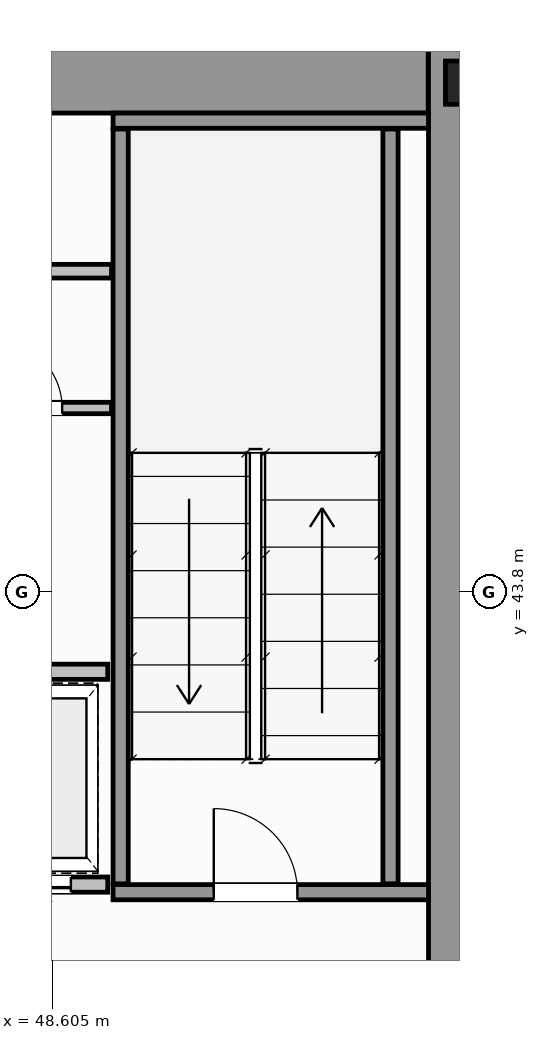
"""IFC4 building model, lengths in metres.
Left out: names, types, materials, properties, quantities, classifications, styles, units other than length and angle.
Written with IfcOpenShell. Run it as: python <this file> out.ifc"""

import sys

from ifc_helpers import new_model, si_unit, direction, frame, frame_2d, origin, origin_2d, place, context, subcontext, project, spatial, rectangle, i_section, extrude, source, transform, mapped, element, fill, save


model = new_model("IFC4")
c1 = context("Model", 3, precision=1e-05, world=origin(), true_north=direction((0.0, 1.0)))
c2 = subcontext(c1, "Body", "Model", "MODEL_VIEW")
j1 = project(units=[si_unit("LENGTHUNIT", "METRE"), si_unit("PLANEANGLEUNIT", "RADIAN")], contexts=[c1])
p1 = place(None, origin())
s1 = spatial("IfcSite", under=j1, at=p1, CompositionType="ELEMENT")
p2 = place(p1, origin())
s2 = spatial("IfcBuilding", under=s1, at=p2, CompositionType="ELEMENT")
p3 = place(p2, frame((0.0, 0.0, 5.6)))
s3 = spatial("IfcBuildingStorey", under=s2, at=p3, CompositionType="ELEMENT", Elevation=5.6)
m1 = source(origin(), c2, "Body", "SweptSolid", [
    extrude(i_section(OverallWidth=0.454, OverallDepth=0.569, WebThickness=0.078, FlangeThickness=0.08, FilletRadius=0.015, at=origin_2d()), origin(), (0.0, 0.0, 1.0), 4.4),
])
p4 = place(p3, frame((54.0, 50.5, 0.0), z_axis=(0.0, 0.0, 1.0), x_axis=(1.0, 0.0, 0.0)))
e1 = element("IfcColumn", 1, at=p4, inside=s3, PredefinedType="COLUMN", context=c2, shape_type="MappedRepresentation", body=[
    mapped(m1, transform((0.0, 0.0, 0.0), scale=1.0)),
])
p5 = place(p3, frame((34.002, 50.55, 0.0), z_axis=(0.0, 0.0, 1.0), x_axis=(1.0, 0.0, 0.0)))
e2 = element("IfcWall", 2, at=p5, inside=s3, PredefinedType="SHEAR", context=c2, shape_type="SweptSolid", body=[
    extrude(rectangle(XDim=19.544, YDim=0.9, at=frame_2d((9.772, 0.0))), origin(), (0.0, 0.0, 1.0), 4.4),
])
p6 = place(p3, frame((54.0, 36.5, 0.0), z_axis=(0.0, 0.0, 1.0), x_axis=(0.0, 1.0, 0.0)))
e3 = element("IfcWall", 3, at=p6, inside=s3, PredefinedType="SHEAR", context=c2, shape_type="SweptSolid", body=[
    extrude(rectangle(XDim=14.5, YDim=0.9, at=frame_2d((7.25, 0.0))), origin(), (0.0, 0.0, 1.0), 4.4),
])
p7 = place(p3, frame((49.4, 39.85, 0.0), z_axis=(0.0, 0.0, 1.0), x_axis=(1.0, 0.0, 0.0)))
e4 = element("IfcWall", 4, at=p7, inside=s3, PredefinedType="SOLIDWALL", context=c2, shape_type="SweptSolid", body=[
    extrude(rectangle(XDim=4.15, YDim=0.2, at=frame_2d((2.075, 0.0))), origin(), (0.0, 0.0, 1.0), 4.4),
])
p8 = place(p7, frame((1.325, 0.0, 0.0)))
e5 = element("IfcOpeningElement", 5, at=p8, cuts=e4, PredefinedType="OPENING", context=c2, shape_type="SweptSolid", body=[
    extrude(rectangle(XDim=1.1, YDim=2.15, at=frame_2d((0.55, 1.075))), frame((0.0, 0.11, 0.0), z_axis=(0.0, -1.0, 0.0), x_axis=(1.0, 0.0, 0.0)), (0.0, 0.0, 1.0), 0.22),
])
p9 = place(p3, frame((49.4, 50.0, 0.0), z_axis=(0.0, 0.0, 1.0), x_axis=(1.0, 0.0, 0.0)))
e6 = element("IfcWall", 6, at=p9, inside=s3, PredefinedType="SOLIDWALL", context=c2, shape_type="SweptSolid", body=[
    extrude(rectangle(XDim=4.15, YDim=0.2, at=frame_2d((2.075, 0.0))), origin(), (0.0, 0.0, 1.0), 4.4),
])
for number, where, z_axis, x_axis in (
    (7, (49.5, 39.96, 0.0), (0.0, 0.0, 1.0), (0.0, 1.0, 0.0)),
    (8, (53.05, 39.96, 0.0), (0.0, 0.0, 1.0), (0.0, 1.0, 0.0)),
):
    element("IfcWall", number, at=place(p3, frame(where, z_axis=z_axis, x_axis=x_axis)), inside=s3, PredefinedType="SOLIDWALL", context=c2, shape_type="SweptSolid", body=[
        extrude(rectangle(XDim=9.93, YDim=0.2, at=frame_2d((4.965, 0.0))), origin(), (0.0, 0.0, 1.0), 4.4),
    ])
p10 = place(p3, frame((47.26, 39.95, 0.0), z_axis=(0.0, 0.0, 1.0), x_axis=(1.0, 0.0, 0.0)))
e9 = element("IfcWall", 9, at=p10, inside=s3, PredefinedType="SOLIDWALL", context=c2, shape_type="SweptSolid", body=[
    extrude(rectangle(XDim=2.07, YDim=0.2, at=frame_2d((1.035, 0.0))), origin(), (0.0, 0.0, 1.0), 4.12),
])
p11 = place(p10, frame((0.485, 0.0, 0.0)))
e10 = element("IfcOpeningElement", 10, at=p11, cuts=e9, PredefinedType="OPENING", context=c2, shape_type="SweptSolid", body=[
    extrude(rectangle(XDim=1.1, YDim=2.15, at=frame_2d((0.55, 1.075))), frame((0.0, 0.11, 0.0), z_axis=(0.0, -1.0, 0.0), x_axis=(1.0, 0.0, 0.0)), (0.0, 0.0, 1.0), 0.22),
])
p12 = place(p3, frame((47.26, 42.75, 0.0), z_axis=(0.0, 0.0, 1.0), x_axis=(1.0, 0.0, 0.0)))
e11 = element("IfcWall", 11, at=p12, inside=s3, PredefinedType="SOLIDWALL", context=c2, shape_type="SweptSolid", body=[
    extrude(rectangle(XDim=2.07, YDim=0.2, at=frame_2d((1.035, 0.0))), origin(), (0.0, 0.0, 1.0), 4.12),
])
p13 = place(p3, frame((47.28, 46.22, 0.0), z_axis=(0.0, 0.0, 1.0), x_axis=(1.0, 0.0, 0.0)))
e12 = element("IfcWall", 12, at=p13, inside=s3, PredefinedType="PARTITIONING", context=c2, shape_type="SweptSolid", body=[
    extrude(rectangle(XDim=2.1, YDim=0.15, at=frame_2d((1.05, 0.0))), origin(), (0.0, 0.0, 1.0), 4.12),
])
p14 = place(p13, frame((0.55, 0.0, 0.0)))
e13 = element("IfcOpeningElement", 13, at=p14, cuts=e12, PredefinedType="OPENING", context=c2, shape_type="SweptSolid", body=[
    extrude(rectangle(XDim=0.9, YDim=2.1, at=frame_2d((0.45, 1.05))), frame((0.0, 0.085, 0.0), z_axis=(0.0, -1.0, 0.0), x_axis=(1.0, 0.0, 0.0)), (0.0, 0.0, 1.0), 0.17),
])
p15 = place(p3, frame((18.62, 48.02, 0.0), z_axis=(0.0, 0.0, 1.0), x_axis=(1.0, 0.0, 0.0)))
e14 = element("IfcWall", 14, at=p15, inside=s3, PredefinedType="PLUMBINGWALL", context=c2, shape_type="SweptSolid", body=[
    extrude(rectangle(XDim=30.76, YDim=0.18, at=frame_2d((15.38, 0.0))), origin(), (0.0, 0.0, 1.0), 4.12),
])
p16 = place(p15, frame((1.955, 0.0, 0.0)))
e15 = element("IfcOpeningElement", 15, at=p16, cuts=e14, PredefinedType="OPENING", context=c2, shape_type="SweptSolid", body=[
    extrude(rectangle(XDim=0.9, YDim=2.15, at=frame_2d((0.45, 1.075))), frame((0.0, 0.1, 0.0), z_axis=(0.0, -1.0, 0.0), x_axis=(1.0, 0.0, 0.0)), (0.0, 0.0, 1.0), 0.2),
])
p17 = place(p15, frame((8.03, 0.0, 0.0)))
e16 = element("IfcOpeningElement", 16, at=p17, cuts=e14, PredefinedType="OPENING", context=c2, shape_type="SweptSolid", body=[
    extrude(rectangle(XDim=0.9, YDim=2.15, at=frame_2d((0.45, 1.075))), frame((0.0, 0.1, 0.0), z_axis=(0.0, -1.0, 0.0), x_axis=(1.0, 0.0, 0.0)), (0.0, 0.0, 1.0), 0.2),
])
p18 = place(p15, frame((16.93, 0.0, 0.0)))
e17 = element("IfcOpeningElement", 17, at=p18, cuts=e14, PredefinedType="OPENING", context=c2, shape_type="SweptSolid", body=[
    extrude(rectangle(XDim=0.9, YDim=2.15, at=frame_2d((0.45, 1.075))), frame((0.0, 0.1, 0.0), z_axis=(0.0, -1.0, 0.0), x_axis=(1.0, 0.0, 0.0)), (0.0, 0.0, 1.0), 0.2),
])
p19 = place(p15, frame((26.205, 0.0, 0.0)))
e18 = element("IfcOpeningElement", 18, at=p19, cuts=e14, PredefinedType="OPENING", context=c2, shape_type="SweptSolid", body=[
    extrude(rectangle(XDim=0.9, YDim=2.15, at=frame_2d((0.45, 1.075))), frame((0.0, 0.1, 0.0), z_axis=(0.0, -1.0, 0.0), x_axis=(1.0, 0.0, 0.0)), (0.0, 0.0, 1.0), 0.2),
])
m2 = source(origin(), c2, "Body", "SweptSolid", [
    extrude(rectangle(XDim=1.1, YDim=2.15, at=frame_2d((0.55, 1.075))), frame((0.0, 0.025, 0.0), z_axis=(0.0, -1.0, 0.0), x_axis=(1.0, 0.0, 0.0)), (0.0, 0.0, 1.0), 0.05),
])
p20 = place(p8, origin())
e19 = element("IfcDoor", 19, at=p20, inside=s3, OperationType="SINGLE_SWING_RIGHT", PredefinedType="DOOR", context=c2, shape_type="MappedRepresentation", body=[
    mapped(m2, transform((0.0, 0.0, 0.0), scale=1.0)),
])
fill(e5, e19)
p21 = place(p11, origin())
e20 = element("IfcDoor", 20, at=p21, inside=s3, OperationType="DOUBLE_DOOR_SLIDING", PredefinedType="DOOR", context=c2, shape_type="MappedRepresentation", body=[
    mapped(m2, transform((0.0, 0.0, 0.0), scale=1.0)),
])
fill(e10, e20)
m3 = source(origin(), c2, "Body", "SweptSolid", [
    extrude(rectangle(XDim=0.9, YDim=2.1, at=frame_2d((0.45, 1.05))), frame((0.0, 0.025, 0.0), z_axis=(0.0, -1.0, 0.0), x_axis=(1.0, 0.0, 0.0)), (0.0, 0.0, 1.0), 0.05),
])
p22 = place(p14, origin())
e21 = element("IfcDoor", 21, at=p22, inside=s3, OperationType="SINGLE_SWING_RIGHT", PredefinedType="DOOR", context=c2, shape_type="MappedRepresentation", body=[
    mapped(m3, transform((0.0, 0.0, 0.0), scale=1.0)),
])
fill(e13, e21)
save(model, sys.argv[1])
